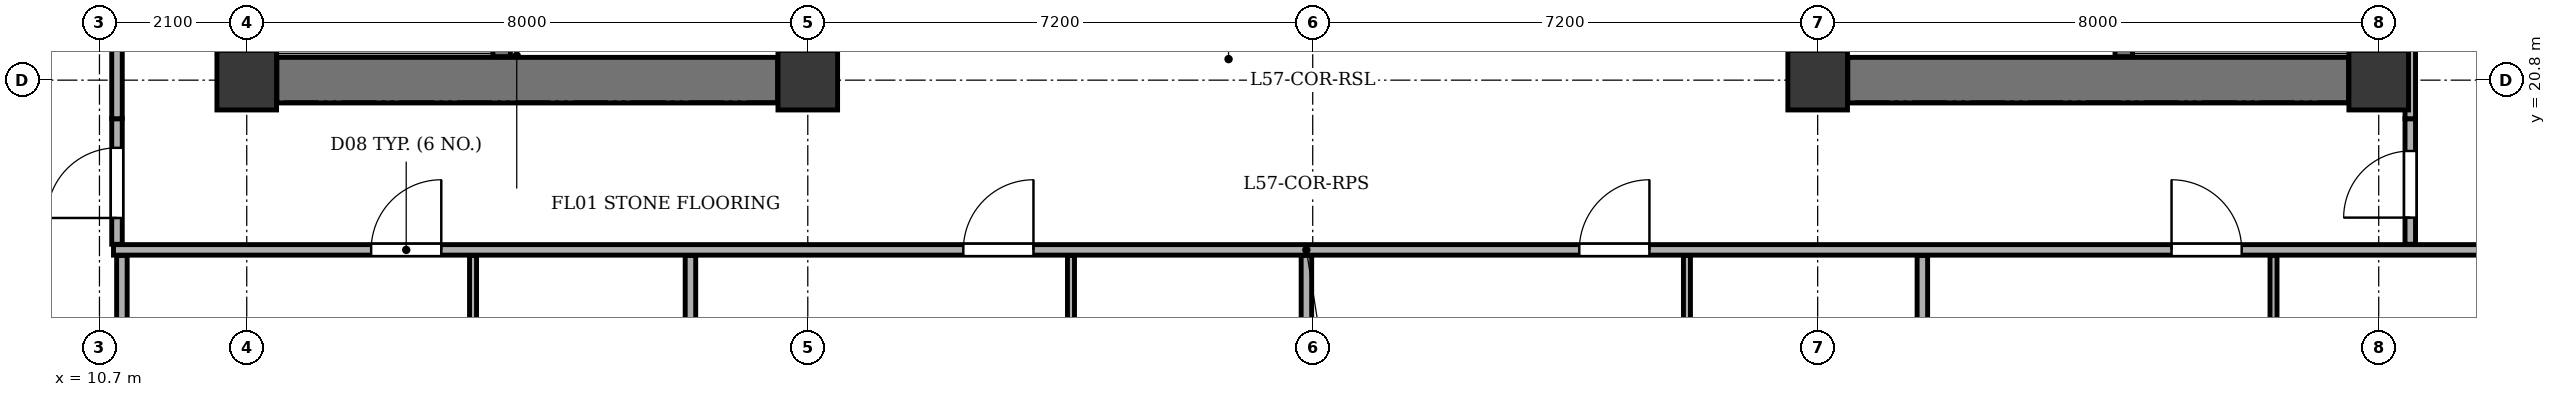
"""IFC4 building model, lengths in metres.
Left out: names, types, materials, properties, quantities, classifications, styles, units other than length and angle.
Written with IfcOpenShell. Run it as: python <this file> out.ifc"""

import sys

from ifc_helpers import new_model, si_unit, direction, frame, frame_2d, origin, origin_2d, place, context, subcontext, project, spatial, rectangle, extrude, element, fill, save


model = new_model("IFC4")
c1 = context("Model", 3, precision=1e-05, world=origin(), true_north=direction((0.0, 1.0)))
c2 = subcontext(c1, "Body", "Model", "MODEL_VIEW")
j1 = project(units=[si_unit("LENGTHUNIT", "METRE"), si_unit("PLANEANGLEUNIT", "RADIAN")], contexts=[c1])
p1 = place(None, origin())
s1 = spatial("IfcSite", under=j1, at=p1, CompositionType="ELEMENT")
p2 = place(p1, origin())
s2 = spatial("IfcBuilding", under=s1, at=p2, CompositionType="ELEMENT")
p3 = place(p2, frame((0.0, 0.0, 221.1)))
s3 = spatial("IfcBuildingStorey", under=s2, at=p3, CompositionType="ELEMENT", Elevation=221.1)
for number, where, z_axis, x_axis in (
    (1, (12.8, 20.8, 0.0), (0.0, 0.0, 1.0), (1.0, 0.0, 0.0)),
    (2, (20.8, 20.8, 0.0), (0.0, 0.0, 1.0), (1.0, 0.0, 0.0)),
    (3, (35.2, 20.8, 0.0), (0.0, 0.0, 1.0), (1.0, 0.0, 0.0)),
    (4, (43.2, 20.8, 0.0), (0.0, 0.0, 1.0), (1.0, 0.0, 0.0)),
):
    element("IfcColumn", number, at=place(p3, frame(where, z_axis=z_axis, x_axis=x_axis)), inside=s3, PredefinedType="COLUMN", context=c2, shape_type="SweptSolid", body=[
        extrude(rectangle(XDim=0.85, YDim=0.85, at=origin_2d()), origin(), (0.0, 0.0, 1.0), 3.4),
    ])
p4 = place(p3, frame((13.23, 20.8, 0.0), z_axis=(0.0, 0.0, 1.0), x_axis=(1.0, 0.0, 0.0)))
e5 = element("IfcWall", 5, at=p4, inside=s3, PredefinedType="SHEAR", context=c2, shape_type="SweptSolid", body=[
    extrude(rectangle(XDim=7.14, YDim=0.65, at=frame_2d((3.57, 0.0))), origin(), (0.0, 0.0, 1.0), 3.1),
])
p5 = place(p3, frame((16.435, 21.135, 0.0), z_axis=(0.0, 0.0, 1.0), x_axis=(0.0, 1.0, 0.0)))
e6 = element("IfcWall", 6, at=p5, inside=s3, PredefinedType="SHEAR", context=c2, shape_type="SweptSolid", body=[
    extrude(rectangle(XDim=12.13, YDim=0.25, at=frame_2d((6.065, 0.0))), origin(), (0.0, 0.0, 1.0), 3.1),
])
p6 = place(p5, frame((0.515, 0.0, 0.0)))
e7 = element("IfcOpeningElement", 7, at=p6, cuts=e6, PredefinedType="OPENING", context=c2, shape_type="SweptSolid", body=[
    extrude(rectangle(XDim=1.2, YDim=2.15, at=frame_2d((0.6, 1.075))), frame((0.0, 0.135, 0.0), z_axis=(0.0, -1.0, 0.0), x_axis=(1.0, 0.0, 0.0)), (0.0, 0.0, 1.0), 0.27),
])
p7 = place(p5, frame((2.665, 0.0, 0.0)))
e8 = element("IfcOpeningElement", 8, at=p7, cuts=e6, PredefinedType="OPENING", context=c2, shape_type="SweptSolid", body=[
    extrude(rectangle(XDim=1.15, YDim=2.15, at=frame_2d((0.575, 1.075))), frame((0.0, 0.135, 0.0), z_axis=(0.0, -1.0, 0.0), x_axis=(1.0, 0.0, 0.0)), (0.0, 0.0, 1.0), 0.27),
])
p8 = place(p3, frame((35.63, 20.8, 0.0), z_axis=(0.0, 0.0, 1.0), x_axis=(1.0, 0.0, 0.0)))
e9 = element("IfcWall", 9, at=p8, inside=s3, PredefinedType="SHEAR", context=c2, shape_type="SweptSolid", body=[
    extrude(rectangle(XDim=7.14, YDim=0.65, at=frame_2d((3.57, 0.0))), origin(), (0.0, 0.0, 1.0), 3.1),
])
p9 = place(p3, frame((39.565, 21.135, 0.0), z_axis=(0.0, 0.0, 1.0), x_axis=(0.0, 1.0, 0.0)))
e10 = element("IfcWall", 10, at=p9, inside=s3, PredefinedType="SHEAR", context=c2, shape_type="SweptSolid", body=[
    extrude(rectangle(XDim=12.13, YDim=0.25, at=frame_2d((6.065, 0.0))), origin(), (0.0, 0.0, 1.0), 3.1),
])
p10 = place(p9, frame((0.515, 0.0, 0.0)))
e11 = element("IfcOpeningElement", 11, at=p10, cuts=e10, PredefinedType="OPENING", context=c2, shape_type="SweptSolid", body=[
    extrude(rectangle(XDim=1.2, YDim=2.15, at=frame_2d((0.6, 1.075))), frame((0.0, 0.135, 0.0), z_axis=(0.0, -1.0, 0.0), x_axis=(1.0, 0.0, 0.0)), (0.0, 0.0, 1.0), 0.27),
])
p11 = place(p9, frame((2.665, 0.0, 0.0)))
e12 = element("IfcOpeningElement", 12, at=p11, cuts=e10, PredefinedType="OPENING", context=c2, shape_type="SweptSolid", body=[
    extrude(rectangle(XDim=1.15, YDim=2.15, at=frame_2d((0.575, 1.075))), frame((0.0, 0.135, 0.0), z_axis=(0.0, -1.0, 0.0), x_axis=(1.0, 0.0, 0.0)), (0.0, 0.0, 1.0), 0.27),
])
p12 = place(p3, frame((10.9, 18.38, 0.0), z_axis=(0.0, 0.0, 1.0), x_axis=(1.0, 0.0, 0.0)))
e13 = element("IfcWall", 13, at=p12, inside=s3, PredefinedType="PARTITIONING", context=c2, shape_type="SweptSolid", body=[
    extrude(rectangle(XDim=34.02, YDim=0.15, at=frame_2d((17.01, 0.0))), origin(), (0.0, 0.0, 1.0), 3.1),
])
p13 = place(p12, frame((3.674, 0.0, 0.0)))
e14 = element("IfcOpeningElement", 14, at=p13, cuts=e13, PredefinedType="OPENING", context=c2, shape_type="SweptSolid", body=[
    extrude(rectangle(XDim=1.0, YDim=2.1, at=frame_2d((0.5, 1.05))), frame((0.0, 0.085, 0.0), z_axis=(0.0, -1.0, 0.0), x_axis=(1.0, 0.0, 0.0)), (0.0, 0.0, 1.0), 0.17),
])
p14 = place(p12, frame((12.118, 0.0, 0.0)))
e15 = element("IfcOpeningElement", 15, at=p14, cuts=e13, PredefinedType="OPENING", context=c2, shape_type="SweptSolid", body=[
    extrude(rectangle(XDim=1.0, YDim=2.1, at=frame_2d((0.5, 1.05))), frame((0.0, 0.085, 0.0), z_axis=(0.0, -1.0, 0.0), x_axis=(1.0, 0.0, 0.0)), (0.0, 0.0, 1.0), 0.17),
])
p15 = place(p12, frame((20.901, 0.0, 0.0)))
e16 = element("IfcOpeningElement", 16, at=p15, cuts=e13, PredefinedType="OPENING", context=c2, shape_type="SweptSolid", body=[
    extrude(rectangle(XDim=1.0, YDim=2.1, at=frame_2d((0.5, 1.05))), frame((0.0, 0.085, 0.0), z_axis=(0.0, -1.0, 0.0), x_axis=(1.0, 0.0, 0.0)), (0.0, 0.0, 1.0), 0.17),
])
p16 = place(p12, frame((29.346, 0.0, 0.0)))
e17 = element("IfcOpeningElement", 17, at=p16, cuts=e13, PredefinedType="OPENING", context=c2, shape_type="SweptSolid", body=[
    extrude(rectangle(XDim=1.0, YDim=2.1, at=frame_2d((0.5, 1.05))), frame((0.0, 0.085, 0.0), z_axis=(0.0, -1.0, 0.0), x_axis=(1.0, 0.0, 0.0)), (0.0, 0.0, 1.0), 0.17),
])
p17 = place(p3, frame((11.02, 3.045, 0.0), z_axis=(0.0, 0.0, 1.0), x_axis=(0.0, 1.0, 0.0)))
e18 = element("IfcWall", 18, at=p17, inside=s3, PredefinedType="PARTITIONING", context=c2, shape_type="SweptSolid", body=[
    extrude(rectangle(XDim=15.255, YDim=0.15, at=frame_2d((7.627, 0.0))), origin(), (0.0, 0.0, 1.0), 3.1),
])
p18 = place(p3, frame((16.027, 5.605, 0.0), z_axis=(0.0, 0.0, 1.0), x_axis=(0.0, 1.0, 0.0)))
e19 = element("IfcWall", 19, at=p18, inside=s3, PredefinedType="PARTITIONING", context=c2, shape_type="SweptSolid", body=[
    extrude(rectangle(XDim=12.695, YDim=0.1, at=frame_2d((6.348, 0.0))), origin(), (0.0, 0.0, 1.0), 3.1),
])
p19 = place(p18, frame((0.605, 0.0, 0.0)))
e20 = element("IfcOpeningElement", 20, at=p19, cuts=e19, PredefinedType="OPENING", context=c2, shape_type="SweptSolid", body=[
    extrude(rectangle(XDim=0.9, YDim=2.05, at=frame_2d((0.45, 1.025))), frame((0.0, 0.06, 0.0), z_axis=(0.0, -1.0, 0.0), x_axis=(1.0, 0.0, 0.0)), (0.0, 0.0, 1.0), 0.12),
])
p20 = place(p3, frame((19.127, 3.045, 0.0), z_axis=(0.0, 0.0, 1.0), x_axis=(0.0, 1.0, 0.0)))
e21 = element("IfcWall", 21, at=p20, inside=s3, PredefinedType="PARTITIONING", context=c2, shape_type="SweptSolid", body=[
    extrude(rectangle(XDim=15.255, YDim=0.15, at=frame_2d((7.627, 0.0))), origin(), (0.0, 0.0, 1.0), 3.1),
])
p21 = place(p3, frame((24.553, 5.605, 0.0), z_axis=(0.0, 0.0, 1.0), x_axis=(0.0, 1.0, 0.0)))
e22 = element("IfcWall", 22, at=p21, inside=s3, PredefinedType="PARTITIONING", context=c2, shape_type="SweptSolid", body=[
    extrude(rectangle(XDim=12.695, YDim=0.1, at=frame_2d((6.348, 0.0))), origin(), (0.0, 0.0, 1.0), 3.1),
])
p22 = place(p21, frame((0.605, 0.0, 0.0)))
e23 = element("IfcOpeningElement", 23, at=p22, cuts=e22, PredefinedType="OPENING", context=c2, shape_type="SweptSolid", body=[
    extrude(rectangle(XDim=0.9, YDim=2.05, at=frame_2d((0.45, 1.025))), frame((0.0, 0.06, 0.0), z_axis=(0.0, -1.0, 0.0), x_axis=(1.0, 0.0, 0.0)), (0.0, 0.0, 1.0), 0.12),
])
p23 = place(p3, frame((27.91, 3.045, 0.0), z_axis=(0.0, 0.0, 1.0), x_axis=(0.0, 1.0, 0.0)))
e24 = element("IfcWall", 24, at=p23, inside=s3, PredefinedType="PARTITIONING", context=c2, shape_type="SweptSolid", body=[
    extrude(rectangle(XDim=15.255, YDim=0.15, at=frame_2d((7.627, 0.0))), origin(), (0.0, 0.0, 1.0), 2.535),
])
p24 = place(p3, frame((33.336, 5.605, 0.0), z_axis=(0.0, 0.0, 1.0), x_axis=(0.0, 1.0, 0.0)))
e25 = element("IfcWall", 25, at=p24, inside=s3, PredefinedType="PARTITIONING", context=c2, shape_type="SweptSolid", body=[
    extrude(rectangle(XDim=12.695, YDim=0.1, at=frame_2d((6.348, 0.0))), origin(), (0.0, 0.0, 1.0), 3.1),
])
p25 = place(p24, frame((0.605, 0.0, 0.0)))
e26 = element("IfcOpeningElement", 26, at=p25, cuts=e25, PredefinedType="OPENING", context=c2, shape_type="SweptSolid", body=[
    extrude(rectangle(XDim=0.9, YDim=2.05, at=frame_2d((0.45, 1.025))), frame((0.0, 0.06, 0.0), z_axis=(0.0, -1.0, 0.0), x_axis=(1.0, 0.0, 0.0)), (0.0, 0.0, 1.0), 0.12),
])
p26 = place(p3, frame((36.693, 3.045, 0.0), z_axis=(0.0, 0.0, 1.0), x_axis=(0.0, 1.0, 0.0)))
e27 = element("IfcWall", 27, at=p26, inside=s3, PredefinedType="PARTITIONING", context=c2, shape_type="SweptSolid", body=[
    extrude(rectangle(XDim=15.255, YDim=0.15, at=frame_2d((7.627, 0.0))), origin(), (0.0, 0.0, 1.0), 2.725),
])
p27 = place(p3, frame((41.7, 5.605, 0.0), z_axis=(0.0, 0.0, 1.0), x_axis=(0.0, 1.0, 0.0)))
e28 = element("IfcWall", 28, at=p27, inside=s3, PredefinedType="PARTITIONING", context=c2, shape_type="SweptSolid", body=[
    extrude(rectangle(XDim=12.695, YDim=0.1, at=frame_2d((6.348, 0.0))), origin(), (0.0, 0.0, 1.0), 3.1),
])
p28 = place(p27, frame((0.605, 0.0, 0.0)))
e29 = element("IfcOpeningElement", 29, at=p28, cuts=e28, PredefinedType="OPENING", context=c2, shape_type="SweptSolid", body=[
    extrude(rectangle(XDim=0.9, YDim=2.05, at=frame_2d((0.45, 1.025))), frame((0.0, 0.06, 0.0), z_axis=(0.0, -1.0, 0.0), x_axis=(1.0, 0.0, 0.0)), (0.0, 0.0, 1.0), 0.12),
])
p29 = place(p3, frame((10.95, 18.46, 0.0), z_axis=(0.0, 0.0, 1.0), x_axis=(0.0, 1.0, 0.0)))
e30 = element("IfcWall", 30, at=p29, inside=s3, PredefinedType="PARTITIONING", context=c2, shape_type="SweptSolid", body=[
    extrude(rectangle(XDim=1.79, YDim=0.15, at=frame_2d((0.895, 0.0))), origin(), (0.0, 0.0, 1.0), 3.1),
])
p30 = place(p29, frame((0.375, 0.0, 0.0)))
e31 = element("IfcOpeningElement", 31, at=p30, cuts=e30, PredefinedType="OPENING", context=c2, shape_type="SweptSolid", body=[
    extrude(rectangle(XDim=1.0, YDim=2.1, at=frame_2d((0.5, 1.05))), frame((0.0, 0.085, 0.0), z_axis=(0.0, -1.0, 0.0), x_axis=(1.0, 0.0, 0.0)), (0.0, 0.0, 1.0), 0.17),
])
p31 = place(p3, frame((10.95, 20.25, 0.0), z_axis=(0.0, 0.0, 1.0), x_axis=(0.0, 1.0, 0.0)))
e32 = element("IfcWall", 32, at=p31, inside=s3, PredefinedType="PARTITIONING", context=c2, shape_type="SweptSolid", body=[
    extrude(rectangle(XDim=13.9, YDim=0.15, at=frame_2d((6.95, 0.0))), origin(), (0.0, 0.0, 1.0), 3.1),
])
p32 = place(p3, frame((43.65, 18.46, 0.0), z_axis=(0.0, 0.0, 1.0), x_axis=(0.0, 1.0, 0.0)))
e33 = element("IfcWall", 33, at=p32, inside=s3, PredefinedType="PARTITIONING", context=c2, shape_type="SweptSolid", body=[
    extrude(rectangle(XDim=1.79, YDim=0.15, at=frame_2d((0.895, 0.0))), origin(), (0.0, 0.0, 1.0), 3.1),
])
p33 = place(p32, frame((0.38, 0.0, 0.0)))
e34 = element("IfcOpeningElement", 34, at=p33, cuts=e33, PredefinedType="OPENING", context=c2, shape_type="SweptSolid", body=[
    extrude(rectangle(XDim=0.95, YDim=2.1, at=frame_2d((0.475, 1.05))), frame((0.0, 0.085, 0.0), z_axis=(0.0, -1.0, 0.0), x_axis=(1.0, 0.0, 0.0)), (0.0, 0.0, 1.0), 0.17),
])
p34 = place(p3, frame((43.65, 20.25, 0.0), z_axis=(0.0, 0.0, 1.0), x_axis=(0.0, 1.0, 0.0)))
e35 = element("IfcWall", 35, at=p34, inside=s3, PredefinedType="PARTITIONING", context=c2, shape_type="SweptSolid", body=[
    extrude(rectangle(XDim=13.27, YDim=0.15, at=frame_2d((6.635, 0.0))), origin(), (0.0, 0.0, 1.0), 3.1),
])
p35 = place(p13, origin())
e36 = element("IfcDoor", 36, at=p35, inside=s3, OperationType="SINGLE_SWING_RIGHT", PredefinedType="DOOR", context=c2, shape_type="SweptSolid", body=[
    extrude(rectangle(XDim=1.0, YDim=2.1, at=frame_2d((0.5, 1.05))), frame((0.0, 0.025, 0.0), z_axis=(0.0, -1.0, 0.0), x_axis=(1.0, 0.0, 0.0)), (0.0, 0.0, 1.0), 0.05),
])
fill(e14, e36)
p36 = place(p14, origin())
e37 = element("IfcDoor", 37, at=p36, inside=s3, OperationType="SINGLE_SWING_RIGHT", PredefinedType="DOOR", context=c2, shape_type="SweptSolid", body=[
    extrude(rectangle(XDim=1.0, YDim=2.1, at=frame_2d((0.5, 1.05))), frame((0.0, 0.025, 0.0), z_axis=(0.0, -1.0, 0.0), x_axis=(1.0, 0.0, 0.0)), (0.0, 0.0, 1.0), 0.05),
])
fill(e15, e37)
p37 = place(p15, origin())
e38 = element("IfcDoor", 38, at=p37, inside=s3, OperationType="SINGLE_SWING_RIGHT", PredefinedType="DOOR", context=c2, shape_type="SweptSolid", body=[
    extrude(rectangle(XDim=1.0, YDim=2.1, at=frame_2d((0.5, 1.05))), frame((0.0, 0.025, 0.0), z_axis=(0.0, -1.0, 0.0), x_axis=(1.0, 0.0, 0.0)), (0.0, 0.0, 1.0), 0.05),
])
fill(e16, e38)
p38 = place(p16, origin())
e39 = element("IfcDoor", 39, at=p38, inside=s3, OperationType="SINGLE_SWING_LEFT", PredefinedType="DOOR", context=c2, shape_type="SweptSolid", body=[
    extrude(rectangle(XDim=1.0, YDim=2.1, at=frame_2d((0.5, 1.05))), frame((0.0, 0.025, 0.0), z_axis=(0.0, -1.0, 0.0), x_axis=(1.0, 0.0, 0.0)), (0.0, 0.0, 1.0), 0.05),
])
fill(e17, e39)
p39 = place(p30, origin())
e40 = element("IfcDoor", 40, at=p39, inside=s3, OperationType="SINGLE_SWING_LEFT", PredefinedType="DOOR", context=c2, shape_type="SweptSolid", body=[
    extrude(rectangle(XDim=1.0, YDim=2.1, at=frame_2d((0.5, 1.05))), frame((0.0, 0.025, 0.0), z_axis=(0.0, -1.0, 0.0), x_axis=(1.0, 0.0, 0.0)), (0.0, 0.0, 1.0), 0.05),
])
fill(e31, e40)
p40 = place(p33, origin())
e41 = element("IfcDoor", 41, at=p40, inside=s3, OperationType="SINGLE_SWING_LEFT", PredefinedType="DOOR", context=c2, shape_type="SweptSolid", body=[
    extrude(rectangle(XDim=0.95, YDim=2.1, at=frame_2d((0.475, 1.05))), frame((0.0, 0.025, 0.0), z_axis=(0.0, -1.0, 0.0), x_axis=(1.0, 0.0, 0.0)), (0.0, 0.0, 1.0), 0.05),
])
fill(e34, e41)
save(model, sys.argv[1])
